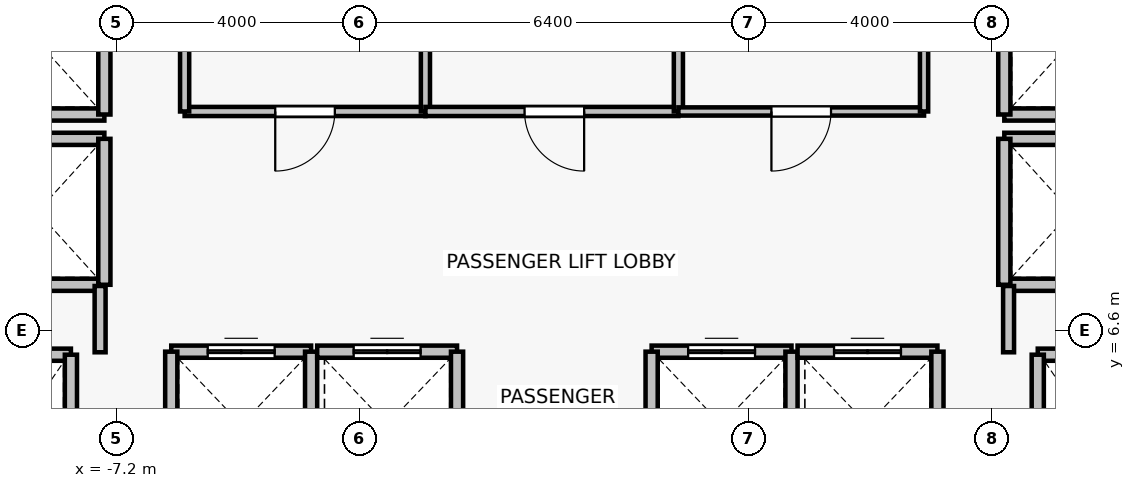
"""IFC4 building model, lengths in metres.
Left out: names, types, materials, properties, quantities, classifications, styles, units other than length and angle.
Written with IfcOpenShell. Run it as: python <this file> out.ifc"""

import sys

from ifc_helpers import new_model, si_unit, direction, frame, frame_2d, origin, place, context, subcontext, project, spatial, rectangle, extrude, source, transform, mapped, element, fill, save


model = new_model("IFC4")
c1 = context("Model", 3, precision=1e-05, world=origin(), true_north=direction((0.0, 1.0)))
c2 = subcontext(c1, "Body", "Model", "MODEL_VIEW")
j1 = project(units=[si_unit("LENGTHUNIT", "METRE"), si_unit("PLANEANGLEUNIT", "RADIAN")], contexts=[c1])
p1 = place(None, origin())
s1 = spatial("IfcSite", under=j1, at=p1, CompositionType="ELEMENT")
p2 = place(p1, origin())
s2 = spatial("IfcBuilding", under=s1, at=p2, CompositionType="ELEMENT")
p3 = place(p2, frame((0.0, 0.0, 172.6)))
s3 = spatial("IfcBuildingStorey", under=s2, at=p3, CompositionType="ELEMENT", Elevation=172.6)
p4 = place(p3, frame((-9.95, 6.2, 0.0), z_axis=(0.0, 0.0, 1.0), x_axis=(1.0, 0.0, 0.0)))
e1 = element("IfcWall", 1, at=p4, inside=s3, PredefinedType="SOLIDWALL", context=c2, shape_type="SweptSolid", body=[
    extrude(rectangle(XDim=2.0, YDim=0.2, at=frame_2d((1.0, 0.0))), origin(), (0.0, 0.0, 1.0), 3.075),
])
p5 = place(p3, frame((-7.95, 6.2, 0.0), z_axis=(0.0, 0.0, 1.0), x_axis=(0.0, -1.0, 0.0)))
e2 = element("IfcWall", 2, at=p5, inside=s3, PredefinedType="SOLIDWALL", context=c2, shape_type="SweptSolid", body=[
    extrude(rectangle(XDim=2.8, YDim=0.2, at=frame_2d((1.4, 0.0))), origin(), (0.0, 0.0, 1.0), 3.075),
])
p6 = place(p3, frame((7.95, 6.2, 0.0), z_axis=(0.0, 0.0, 1.0), x_axis=(1.0, 0.0, 0.0)))
e3 = element("IfcWall", 3, at=p6, inside=s3, PredefinedType="SOLIDWALL", context=c2, shape_type="SweptSolid", body=[
    extrude(rectangle(XDim=2.0, YDim=0.2, at=frame_2d((1.0, 0.0))), origin(), (0.0, 0.0, 1.0), 3.075),
])
p7 = place(p3, frame((7.95, 3.4, 0.0), z_axis=(0.0, 0.0, 1.0), x_axis=(0.0, 1.0, 0.0)))
e4 = element("IfcWall", 4, at=p7, inside=s3, PredefinedType="SOLIDWALL", context=c2, shape_type="SweptSolid", body=[
    extrude(rectangle(XDim=2.8, YDim=0.2, at=frame_2d((1.4, 0.0))), origin(), (0.0, 0.0, 1.0), 3.075),
])
p8 = place(p3, frame((-6.3, 6.25, 0.0), z_axis=(0.0, 0.0, 1.0), x_axis=(1.0, 0.0, 0.0)))
e5 = element("IfcWall", 5, at=p8, inside=s3, PredefinedType="SOLIDWALL", context=c2, shape_type="SweptSolid", body=[
    extrude(rectangle(XDim=2.3, YDim=0.2, at=frame_2d((1.15, 0.0))), origin(), (0.0, 0.0, 1.0), 3.075),
])
p9 = place(p8, frame((0.6, 0.0, 0.0)))
e6 = element("IfcOpeningElement", 6, at=p9, cuts=e5, PredefinedType="OPENING", context=c2, shape_type="SweptSolid", body=[
    extrude(rectangle(XDim=1.1, YDim=2.2, at=frame_2d((0.55, 1.1))), frame((0.0, 0.11, 0.0), z_axis=(0.0, -1.0, 0.0), x_axis=(1.0, 0.0, 0.0)), (0.0, 0.0, 1.0), 0.22),
])
for number, where, z_axis, x_axis in (
    (7, (-6.3, 3.85, 0.0), (0.0, 0.0, 1.0), (0.0, 1.0, 0.0)),
    (8, (-4.0, 6.25, 0.0), (0.0, 0.0, 1.0), (0.0, -1.0, 0.0)),
):
    element("IfcWall", number, at=place(p3, frame(where, z_axis=z_axis, x_axis=x_axis)), inside=s3, PredefinedType="SOLIDWALL", context=c2, shape_type="SweptSolid", body=[
        extrude(rectangle(XDim=2.4, YDim=0.2, at=frame_2d((1.2, 0.0))), origin(), (0.0, 0.0, 1.0), 3.075),
    ])
p10 = place(p3, frame((-3.9, 6.25, 0.0), z_axis=(0.0, 0.0, 1.0), x_axis=(1.0, 0.0, 0.0)))
e9 = element("IfcWall", 9, at=p10, inside=s3, PredefinedType="SOLIDWALL", context=c2, shape_type="SweptSolid", body=[
    extrude(rectangle(XDim=2.3, YDim=0.2, at=frame_2d((1.15, 0.0))), origin(), (0.0, 0.0, 1.0), 3.075),
])
p11 = place(p10, frame((0.6, 0.0, 0.0)))
e10 = element("IfcOpeningElement", 10, at=p11, cuts=e9, PredefinedType="OPENING", context=c2, shape_type="SweptSolid", body=[
    extrude(rectangle(XDim=1.1, YDim=2.2, at=frame_2d((0.55, 1.1))), frame((0.0, 0.11, 0.0), z_axis=(0.0, -1.0, 0.0), x_axis=(1.0, 0.0, 0.0)), (0.0, 0.0, 1.0), 0.22),
])
p12 = place(p3, frame((-1.6, 6.25, 0.0), z_axis=(0.0, 0.0, 1.0), x_axis=(0.0, -1.0, 0.0)))
e11 = element("IfcWall", 11, at=p12, inside=s3, PredefinedType="SOLIDWALL", context=c2, shape_type="SweptSolid", body=[
    extrude(rectangle(XDim=2.4, YDim=0.2, at=frame_2d((1.2, 0.0))), origin(), (0.0, 0.0, 1.0), 3.075),
])
p13 = place(p3, frame((1.6, 6.25, 0.0), z_axis=(0.0, 0.0, 1.0), x_axis=(1.0, 0.0, 0.0)))
e12 = element("IfcWall", 12, at=p13, inside=s3, PredefinedType="SOLIDWALL", context=c2, shape_type="SweptSolid", body=[
    extrude(rectangle(XDim=2.3, YDim=0.2, at=frame_2d((1.15, 0.0))), origin(), (0.0, 0.0, 1.0), 3.075),
])
p14 = place(p13, frame((0.6, 0.0, 0.0)))
e13 = element("IfcOpeningElement", 13, at=p14, cuts=e12, PredefinedType="OPENING", context=c2, shape_type="SweptSolid", body=[
    extrude(rectangle(XDim=1.1, YDim=2.2, at=frame_2d((0.55, 1.1))), frame((0.0, 0.11, 0.0), z_axis=(0.0, -1.0, 0.0), x_axis=(1.0, 0.0, 0.0)), (0.0, 0.0, 1.0), 0.22),
])
for number, where, z_axis, x_axis in (
    (14, (1.6, 3.85, 0.0), (0.0, 0.0, 1.0), (0.0, 1.0, 0.0)),
    (15, (3.9, 6.25, 0.0), (0.0, 0.0, 1.0), (0.0, -1.0, 0.0)),
):
    element("IfcWall", number, at=place(p3, frame(where, z_axis=z_axis, x_axis=x_axis)), inside=s3, PredefinedType="SOLIDWALL", context=c2, shape_type="SweptSolid", body=[
        extrude(rectangle(XDim=2.4, YDim=0.2, at=frame_2d((1.2, 0.0))), origin(), (0.0, 0.0, 1.0), 3.075),
    ])
p15 = place(p3, frame((4.0, 6.25, 0.0), z_axis=(0.0, 0.0, 1.0), x_axis=(1.0, 0.0, 0.0)))
e16 = element("IfcWall", 16, at=p15, inside=s3, PredefinedType="SOLIDWALL", context=c2, shape_type="SweptSolid", body=[
    extrude(rectangle(XDim=2.3, YDim=0.2, at=frame_2d((1.15, 0.0))), origin(), (0.0, 0.0, 1.0), 3.075),
])
p16 = place(p15, frame((0.6, 0.0, 0.0)))
e17 = element("IfcOpeningElement", 17, at=p16, cuts=e16, PredefinedType="OPENING", context=c2, shape_type="SweptSolid", body=[
    extrude(rectangle(XDim=1.1, YDim=2.2, at=frame_2d((0.55, 1.1))), frame((0.0, 0.11, 0.0), z_axis=(0.0, -1.0, 0.0), x_axis=(1.0, 0.0, 0.0)), (0.0, 0.0, 1.0), 0.22),
])
p17 = place(p3, frame((6.3, 6.25, 0.0), z_axis=(0.0, 0.0, 1.0), x_axis=(0.0, -1.0, 0.0)))
e18 = element("IfcWall", 18, at=p17, inside=s3, PredefinedType="SOLIDWALL", context=c2, shape_type="SweptSolid", body=[
    extrude(rectangle(XDim=2.4, YDim=0.2, at=frame_2d((1.2, 0.0))), origin(), (0.0, 0.0, 1.0), 3.075),
])
for number, where, z_axis, x_axis in (
    (19, (-7.4, 7.35, 0.0), (0.0, 0.0, 1.0), (-1.0, 0.0, 0.0)),
    (20, (-9.6, 9.75, 0.0), (0.0, 0.0, 1.0), (1.0, 0.0, 0.0)),
):
    element("IfcWall", number, at=place(p3, frame(where, z_axis=z_axis, x_axis=x_axis)), inside=s3, PredefinedType="SOLIDWALL", context=c2, shape_type="SweptSolid", body=[
        extrude(rectangle(XDim=2.2, YDim=0.2, at=frame_2d((1.1, 0.0))), origin(), (0.0, 0.0, 1.0), 2.565),
    ])
p18 = place(p3, frame((-7.4, 9.75, 0.0), z_axis=(0.0, 0.0, 1.0), x_axis=(0.0, -1.0, 0.0)))
e21 = element("IfcWall", 21, at=p18, inside=s3, PredefinedType="SOLIDWALL", context=c2, shape_type="SweptSolid", body=[
    extrude(rectangle(XDim=2.4, YDim=0.2, at=frame_2d((1.2, 0.0))), origin(), (0.0, 0.0, 1.0), 2.565),
])
p19 = place(p3, frame((-7.4, 10.15, 0.0), z_axis=(0.0, 0.0, 1.0), x_axis=(-1.0, 0.0, 0.0)))
e22 = element("IfcWall", 22, at=p19, inside=s3, PredefinedType="SOLIDWALL", context=c2, shape_type="SweptSolid", body=[
    extrude(rectangle(XDim=2.2, YDim=0.2, at=frame_2d((1.1, 0.0))), origin(), (0.0, 0.0, 1.0), 2.565),
])
p20 = place(p3, frame((-7.4, 12.55, 0.0), z_axis=(0.0, 0.0, 1.0), x_axis=(0.0, -1.0, 0.0)))
e23 = element("IfcWall", 23, at=p20, inside=s3, PredefinedType="SOLIDWALL", context=c2, shape_type="SweptSolid", body=[
    extrude(rectangle(XDim=2.4, YDim=0.2, at=frame_2d((1.2, 0.0))), origin(), (0.0, 0.0, 1.0), 2.565),
])
for number, where, z_axis, x_axis in (
    (24, (9.6, 7.35, 0.0), (0.0, 0.0, 1.0), (-1.0, 0.0, 0.0)),
    (25, (7.4, 9.75, 0.0), (0.0, 0.0, 1.0), (1.0, 0.0, 0.0)),
):
    element("IfcWall", number, at=place(p3, frame(where, z_axis=z_axis, x_axis=x_axis)), inside=s3, PredefinedType="SOLIDWALL", context=c2, shape_type="SweptSolid", body=[
        extrude(rectangle(XDim=2.2, YDim=0.2, at=frame_2d((1.1, 0.0))), origin(), (0.0, 0.0, 1.0), 2.565),
    ])
p21 = place(p3, frame((7.4, 7.35, 0.0), z_axis=(0.0, 0.0, 1.0), x_axis=(0.0, 1.0, 0.0)))
e26 = element("IfcWall", 26, at=p21, inside=s3, PredefinedType="SOLIDWALL", context=c2, shape_type="SweptSolid", body=[
    extrude(rectangle(XDim=2.4, YDim=0.2, at=frame_2d((1.2, 0.0))), origin(), (0.0, 0.0, 1.0), 2.565),
])
p22 = place(p3, frame((9.6, 10.15, 0.0), z_axis=(0.0, 0.0, 1.0), x_axis=(-1.0, 0.0, 0.0)))
e27 = element("IfcWall", 27, at=p22, inside=s3, PredefinedType="SOLIDWALL", context=c2, shape_type="SweptSolid", body=[
    extrude(rectangle(XDim=2.2, YDim=0.2, at=frame_2d((1.1, 0.0))), origin(), (0.0, 0.0, 1.0), 2.565),
])
p23 = place(p3, frame((7.4, 10.15, 0.0), z_axis=(0.0, 0.0, 1.0), x_axis=(0.0, 1.0, 0.0)))
e28 = element("IfcWall", 28, at=p23, inside=s3, PredefinedType="SOLIDWALL", context=c2, shape_type="SweptSolid", body=[
    extrude(rectangle(XDim=2.4, YDim=0.2, at=frame_2d((1.2, 0.0))), origin(), (0.0, 0.0, 1.0), 2.565),
])
for number, where, z_axis, x_axis in (
    (29, (-7.47, 7.33, 0.0), (0.0, 0.0, 1.0), (0.0, -1.0, 0.0)),
    (30, (7.47, 6.24, 0.0), (0.0, 0.0, 1.0), (0.0, 1.0, 0.0)),
):
    element("IfcWall", number, at=place(p3, frame(where, z_axis=z_axis, x_axis=x_axis)), inside=s3, PredefinedType="PARTITIONING", context=c2, shape_type="SweptSolid", body=[
        extrude(rectangle(XDim=1.09, YDim=0.18, at=frame_2d((0.545, 0.0))), origin(), (0.0, 0.0, 1.0), 2.565),
    ])
p24 = place(p3, frame((-2.12, 10.2, 0.0), z_axis=(0.0, 0.0, 1.0), x_axis=(-1.0, 0.0, 0.0)))
e31 = element("IfcWall", 31, at=p24, inside=s3, PredefinedType="PARTITIONING", context=c2, shape_type="SweptSolid", body=[
    extrude(rectangle(XDim=3.96, YDim=0.15, at=frame_2d((1.98, 0.0))), origin(), (0.0, 0.0, 1.0), 3.075),
])
p25 = place(p24, frame((1.49, 0.0, 0.0)))
e32 = element("IfcOpeningElement", 32, at=p25, cuts=e31, PredefinedType="OPENING", context=c2, shape_type="SweptSolid", body=[
    extrude(rectangle(XDim=0.98, YDim=2.15, at=frame_2d((0.49, 1.075))), frame((0.0, 0.085, 0.0), z_axis=(0.0, -1.0, 0.0), x_axis=(1.0, 0.0, 0.0)), (0.0, 0.0, 1.0), 0.17),
])
for number, where, z_axis, x_axis in (
    (33, (-6.08, 10.2, 0.0), (0.0, 0.0, 1.0), (0.0, 1.0, 0.0)),
    (34, (-2.12, 13.0, 0.0), (0.0, 0.0, 1.0), (0.0, -1.0, 0.0)),
):
    element("IfcWall", number, at=place(p3, frame(where, z_axis=z_axis, x_axis=x_axis)), inside=s3, PredefinedType="PARTITIONING", context=c2, shape_type="SweptSolid", body=[
        extrude(rectangle(XDim=2.8, YDim=0.15, at=frame_2d((1.4, 0.0))), origin(), (0.0, 0.0, 1.0), 3.075),
    ])
p26 = place(p3, frame((2.04, 10.2, 0.0), z_axis=(0.0, 0.0, 1.0), x_axis=(-1.0, 0.0, 0.0)))
e35 = element("IfcWall", 35, at=p26, inside=s3, PredefinedType="PARTITIONING", context=c2, shape_type="SweptSolid", body=[
    extrude(rectangle(XDim=4.16, YDim=0.15, at=frame_2d((2.08, 0.0))), origin(), (0.0, 0.0, 1.0), 3.075),
])
p27 = place(p26, frame((1.55, 0.0, 0.0)))
e36 = element("IfcOpeningElement", 36, at=p27, cuts=e35, PredefinedType="OPENING", context=c2, shape_type="SweptSolid", body=[
    extrude(rectangle(XDim=0.98, YDim=2.15, at=frame_2d((0.49, 1.075))), frame((0.0, 0.085, 0.0), z_axis=(0.0, -1.0, 0.0), x_axis=(1.0, 0.0, 0.0)), (0.0, 0.0, 1.0), 0.17),
])
p28 = place(p3, frame((2.04, 13.0, 0.0), z_axis=(0.0, 0.0, 1.0), x_axis=(0.0, -1.0, 0.0)))
e37 = element("IfcWall", 37, at=p28, inside=s3, PredefinedType="PARTITIONING", context=c2, shape_type="SweptSolid", body=[
    extrude(rectangle(XDim=2.8, YDim=0.15, at=frame_2d((1.4, 0.0))), origin(), (0.0, 0.0, 1.0), 3.075),
])
p29 = place(p3, frame((6.08, 10.2, 0.0), z_axis=(0.0, 0.0, 1.0), x_axis=(-1.0, 0.0, 0.0)))
e38 = element("IfcWall", 38, at=p29, inside=s3, PredefinedType="PARTITIONING", context=c2, shape_type="SweptSolid", body=[
    extrude(rectangle(XDim=4.04, YDim=0.135, at=frame_2d((2.02, 0.0))), origin(), (0.0, 0.0, 1.0), 3.075),
])
p30 = place(p29, frame((1.53, 0.0, 0.0)))
e39 = element("IfcOpeningElement", 39, at=p30, cuts=e38, PredefinedType="OPENING", context=c2, shape_type="SweptSolid", body=[
    extrude(rectangle(XDim=0.98, YDim=2.15, at=frame_2d((0.49, 1.075))), frame((0.0, 0.077, 0.0), z_axis=(0.0, -1.0, 0.0), x_axis=(1.0, 0.0, 0.0)), (0.0, 0.0, 1.0), 0.155),
])
p31 = place(p3, frame((6.08, 13.0, 0.0), z_axis=(0.0, 0.0, 1.0), x_axis=(0.0, -1.0, 0.0)))
e40 = element("IfcWall", 40, at=p31, inside=s3, PredefinedType="PARTITIONING", context=c2, shape_type="SweptSolid", body=[
    extrude(rectangle(XDim=2.8, YDim=0.135, at=frame_2d((1.4, 0.0))), origin(), (0.0, 0.0, 1.0), 3.075),
])
m1 = source(origin(), c2, "Body", "SweptSolid", [
    extrude(rectangle(XDim=1.1, YDim=2.2, at=frame_2d((0.55, 1.1))), frame((0.0, 0.025, 0.0), z_axis=(0.0, -1.0, 0.0), x_axis=(1.0, 0.0, 0.0)), (0.0, 0.0, 1.0), 0.05),
])
p32 = place(p9, origin())
e41 = element("IfcDoor", 41, at=p32, inside=s3, OperationType="DOUBLE_DOOR_SLIDING", PredefinedType="DOOR", context=c2, shape_type="MappedRepresentation", body=[
    mapped(m1, transform((0.0, 0.0, 0.0), x_axis=(1.0, 0.0, 0.0), y_axis=(0.0, 1.0, 0.0), z_axis=(0.0, 0.0, 1.0), scale=1.0)),
])
fill(e6, e41)
p33 = place(p11, origin())
e42 = element("IfcDoor", 42, at=p33, inside=s3, OperationType="DOUBLE_DOOR_SLIDING", PredefinedType="DOOR", context=c2, shape_type="MappedRepresentation", body=[
    mapped(m1, transform((0.0, 0.0, 0.0), x_axis=(1.0, 0.0, 0.0), y_axis=(0.0, 1.0, 0.0), z_axis=(0.0, 0.0, 1.0), scale=1.0)),
])
fill(e10, e42)
p34 = place(p14, origin())
e43 = element("IfcDoor", 43, at=p34, inside=s3, OperationType="DOUBLE_DOOR_SLIDING", PredefinedType="DOOR", context=c2, shape_type="MappedRepresentation", body=[
    mapped(m1, transform((0.0, 0.0, 0.0), x_axis=(1.0, 0.0, 0.0), y_axis=(0.0, 1.0, 0.0), z_axis=(0.0, 0.0, 1.0), scale=1.0)),
])
fill(e13, e43)
p35 = place(p16, origin())
e44 = element("IfcDoor", 44, at=p35, inside=s3, OperationType="DOUBLE_DOOR_SLIDING", PredefinedType="DOOR", context=c2, shape_type="MappedRepresentation", body=[
    mapped(m1, transform((0.0, 0.0, 0.0), x_axis=(1.0, 0.0, 0.0), y_axis=(0.0, 1.0, 0.0), z_axis=(0.0, 0.0, 1.0), scale=1.0)),
])
fill(e17, e44)
m2 = source(origin(), c2, "Body", "SweptSolid", [
    extrude(rectangle(XDim=0.98, YDim=2.15, at=frame_2d((0.49, 1.075))), frame((0.0, 0.025, 0.0), z_axis=(0.0, -1.0, 0.0), x_axis=(1.0, 0.0, 0.0)), (0.0, 0.0, 1.0), 0.05),
])
p36 = place(p25, origin())
e45 = element("IfcDoor", 45, at=p36, inside=s3, OperationType="SINGLE_SWING_RIGHT", PredefinedType="DOOR", context=c2, shape_type="MappedRepresentation", body=[
    mapped(m2, transform((0.0, 0.0, 0.0), x_axis=(1.0, 0.0, 0.0), y_axis=(0.0, 1.0, 0.0), z_axis=(0.0, 0.0, 1.0), scale=1.0)),
])
fill(e32, e45)
p37 = place(p27, origin())
e46 = element("IfcDoor", 46, at=p37, inside=s3, OperationType="SINGLE_SWING_LEFT", PredefinedType="DOOR", context=c2, shape_type="MappedRepresentation", body=[
    mapped(m2, transform((0.0, 0.0, 0.0), x_axis=(1.0, 0.0, 0.0), y_axis=(0.0, 1.0, 0.0), z_axis=(0.0, 0.0, 1.0), scale=1.0)),
])
fill(e36, e46)
p38 = place(p30, origin())
e47 = element("IfcDoor", 47, at=p38, inside=s3, OperationType="SINGLE_SWING_RIGHT", PredefinedType="DOOR", context=c2, shape_type="MappedRepresentation", body=[
    mapped(m2, transform((0.0, 0.0, 0.0), x_axis=(1.0, 0.0, 0.0), y_axis=(0.0, 1.0, 0.0), z_axis=(0.0, 0.0, 1.0), scale=1.0)),
])
fill(e39, e47)
save(model, sys.argv[1])
